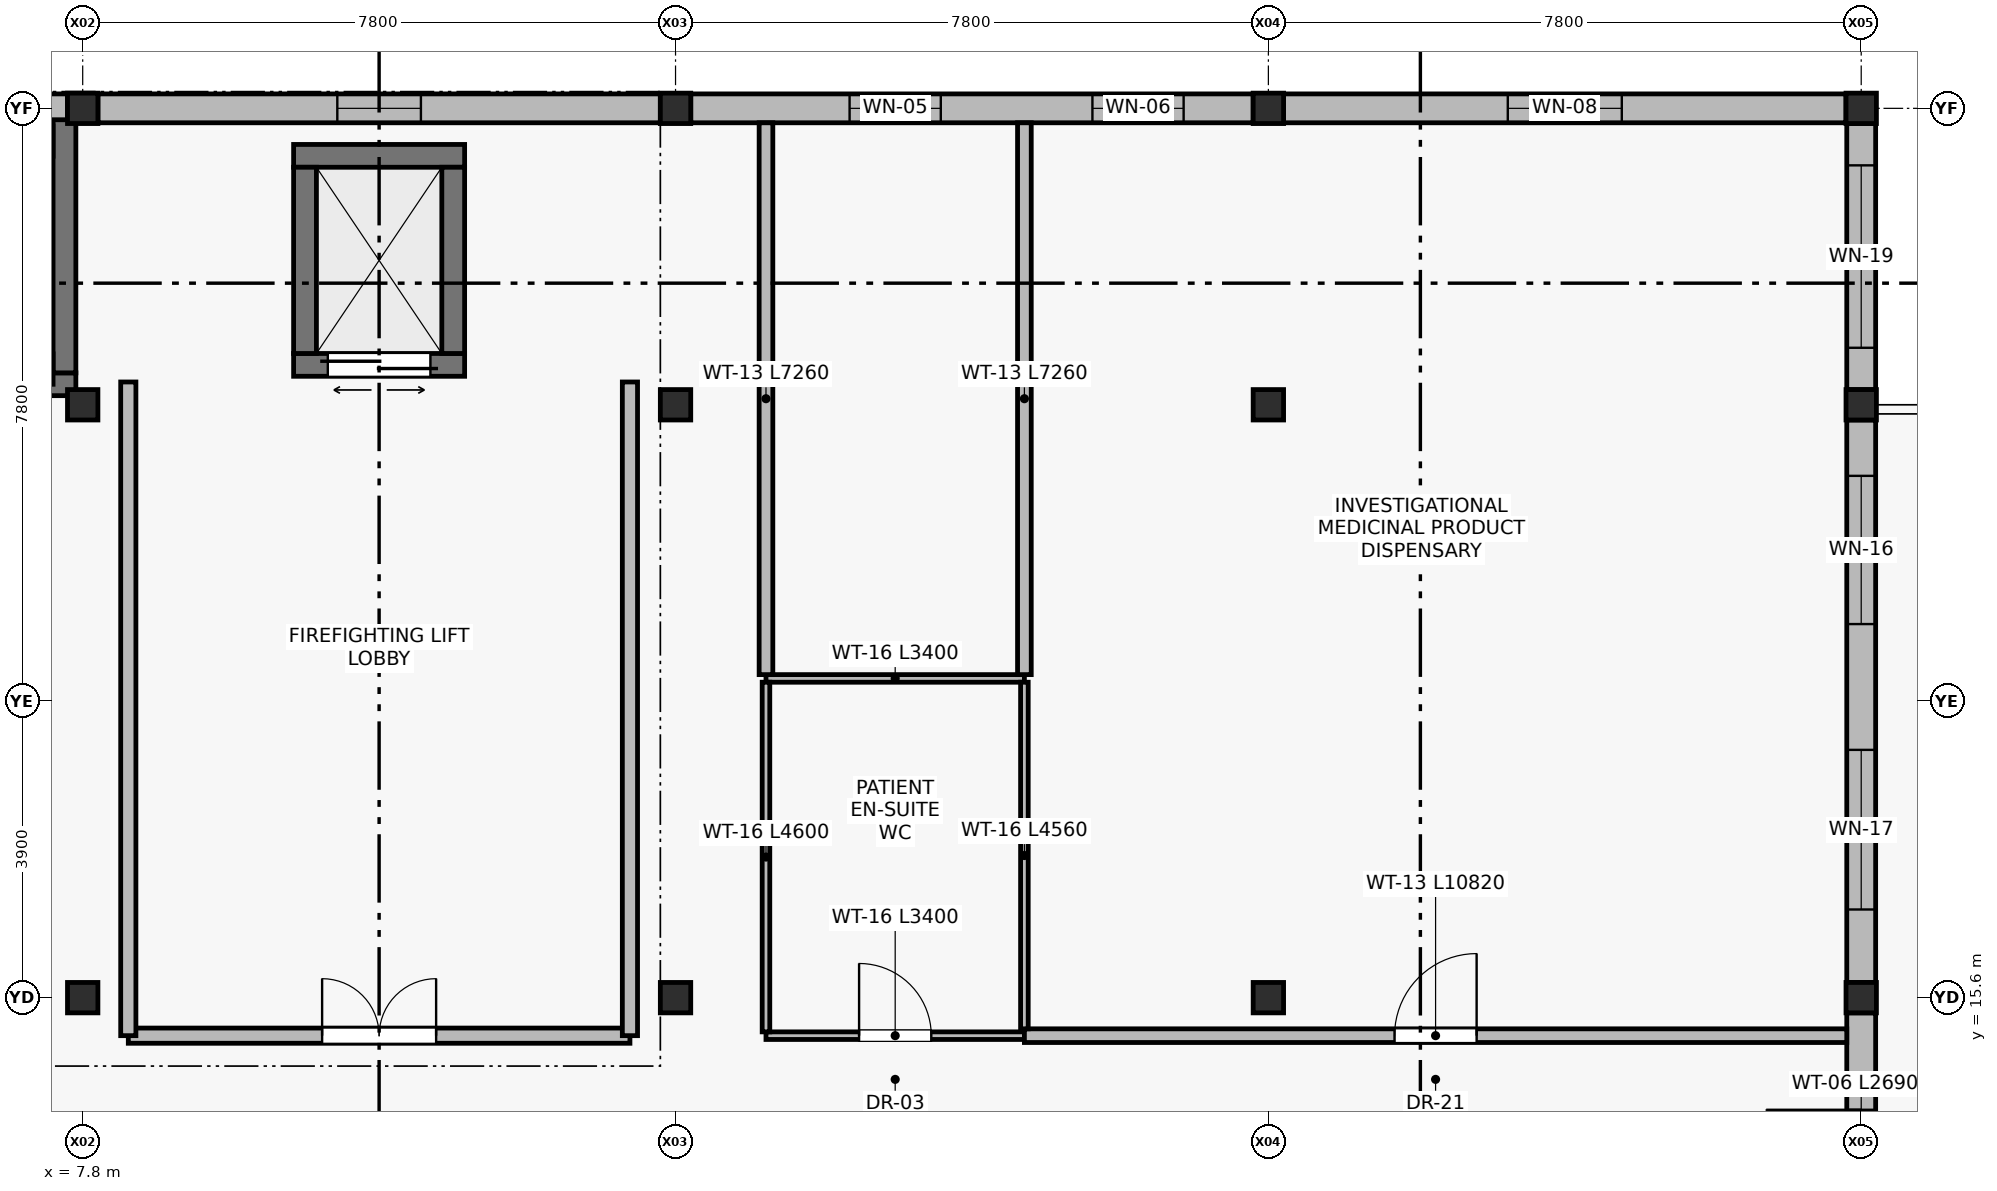
"""IFC4 building model, lengths in metres.
Left out: names, types, materials, properties, quantities, classifications, styles, units other than length and angle.
Written with IfcOpenShell. Run it as: python <this file> out.ifc"""

import sys

from ifc_helpers import new_model, si_unit, direction, frame, frame_2d, origin, origin_2d, place, context, subcontext, project, spatial, rectangle, extrude, element, fill, save


model = new_model("IFC4")
c1 = context("Model", 3, precision=1e-05, world=origin(), true_north=direction((0.0, 1.0)))
c2 = subcontext(c1, "Body", "Model", "MODEL_VIEW")
j1 = project(units=[si_unit("LENGTHUNIT", "METRE"), si_unit("PLANEANGLEUNIT", "RADIAN")], contexts=[c1])
p1 = place(None, origin())
s1 = spatial("IfcSite", under=j1, at=p1, CompositionType="ELEMENT")
p2 = place(p1, origin())
s2 = spatial("IfcBuilding", under=s1, at=p2, CompositionType="ELEMENT")
p3 = place(p2, frame((0.0, 0.0, 18.6)))
s3 = spatial("IfcBuildingStorey", under=s2, at=p3, CompositionType="ELEMENT", Elevation=18.6)
for number, where, z_axis, x_axis in (
    (1, (7.8, 15.6, 0.0), (0.0, 0.0, 1.0), (1.0, 0.0, 0.0)),
    (2, (7.8, 23.4, 0.0), (0.0, 0.0, 1.0), (1.0, 0.0, 0.0)),
    (3, (7.8, 27.3, 0.0), (0.0, 0.0, 1.0), (1.0, 0.0, 0.0)),
    (4, (15.6, 15.6, 0.0), (0.0, 0.0, 1.0), (1.0, 0.0, 0.0)),
    (5, (15.6, 23.4, 0.0), (0.0, 0.0, 1.0), (1.0, 0.0, 0.0)),
    (6, (15.6, 27.3, 0.0), (0.0, 0.0, 1.0), (1.0, 0.0, 0.0)),
    (7, (23.4, 15.6, 0.0), (0.0, 0.0, 1.0), (1.0, 0.0, 0.0)),
    (8, (23.4, 23.4, 0.0), (0.0, 0.0, 1.0), (1.0, 0.0, 0.0)),
    (9, (23.4, 27.3, 0.0), (0.0, 0.0, 1.0), (1.0, 0.0, 0.0)),
    (10, (31.2, 15.6, 0.0), (0.0, 0.0, 1.0), (1.0, 0.0, 0.0)),
    (11, (31.2, 23.4, 0.0), (0.0, 0.0, 1.0), (1.0, 0.0, 0.0)),
    (12, (31.2, 27.3, 0.0), (0.0, 0.0, 1.0), (1.0, 0.0, 0.0)),
    (13, (7.21, 23.87, 0.0), (0.0, 0.0, 1.0), (1.0, 0.0, 0.0)),
    (14, (7.21, 26.87, 0.0), (0.0, 0.0, 1.0), (1.0, 0.0, 0.0)),
):
    element("IfcColumn", number, at=place(p3, frame(where, z_axis=z_axis, x_axis=x_axis)), inside=s3, PredefinedType="COLUMN", context=c2, shape_type="SweptSolid", body=[
        extrude(rectangle(XDim=0.4, YDim=0.4, at=origin_2d()), origin(), (0.0, 0.0, 1.0), 4.5),
    ])
p4 = place(p3, frame((0.2, 27.3, 0.0), z_axis=(0.0, 0.0, 1.0), x_axis=(1.0, 0.0, 0.0)))
e15 = element("IfcWall", 15, at=p4, inside=s3, PredefinedType="STANDARD", context=c2, shape_type="SweptSolid", body=[
    extrude(rectangle(XDim=7.4, YDim=0.38, at=frame_2d((3.7, 0.0))), origin(), (0.0, 0.0, 1.0), 3.95),
])
p5 = place(p4, frame((0.895, 0.0, 0.9)))
e16 = element("IfcOpeningElement", 16, at=p5, cuts=e15, PredefinedType="OPENING", context=c2, shape_type="SweptSolid", body=[
    extrude(rectangle(XDim=0.9, YDim=1.6, at=frame_2d((0.45, 0.8))), frame((0.0, 0.2, 0.0), z_axis=(0.0, -1.0, 0.0), x_axis=(1.0, 0.0, 0.0)), (0.0, 0.0, 1.0), 0.4),
])
p6 = place(p4, frame((4.01, 0.0, 0.9)))
e17 = element("IfcOpeningElement", 17, at=p6, cuts=e15, PredefinedType="OPENING", context=c2, shape_type="SweptSolid", body=[
    extrude(rectangle(XDim=0.9, YDim=1.6, at=frame_2d((0.45, 0.8))), frame((0.0, 0.2, 0.0), z_axis=(0.0, -1.0, 0.0), x_axis=(1.0, 0.0, 0.0)), (0.0, 0.0, 1.0), 0.4),
])
p7 = place(p3, frame((8.0, 27.3, 0.0), z_axis=(0.0, 0.0, 1.0), x_axis=(1.0, 0.0, 0.0)))
e18 = element("IfcWall", 18, at=p7, inside=s3, PredefinedType="STANDARD", context=c2, shape_type="SweptSolid", body=[
    extrude(rectangle(XDim=7.4, YDim=0.38, at=frame_2d((3.7, 0.0))), origin(), (0.0, 0.0, 1.0), 3.95),
])
p8 = place(p7, frame((3.15, 0.0, 0.9)))
e19 = element("IfcOpeningElement", 19, at=p8, cuts=e18, PredefinedType="OPENING", context=c2, shape_type="SweptSolid", body=[
    extrude(rectangle(XDim=1.1, YDim=1.6, at=frame_2d((0.55, 0.8))), frame((0.0, 0.2, 0.0), z_axis=(0.0, -1.0, 0.0), x_axis=(1.0, 0.0, 0.0)), (0.0, 0.0, 1.0), 0.4),
])
p9 = place(p3, frame((15.8, 27.3, 0.0), z_axis=(0.0, 0.0, 1.0), x_axis=(1.0, 0.0, 0.0)))
e20 = element("IfcWall", 20, at=p9, inside=s3, PredefinedType="STANDARD", context=c2, shape_type="SweptSolid", body=[
    extrude(rectangle(XDim=7.4, YDim=0.38, at=frame_2d((3.7, 0.0))), origin(), (0.0, 0.0, 1.0), 3.95),
])
p10 = place(p9, frame((2.09, 0.0, 0.9)))
e21 = element("IfcOpeningElement", 21, at=p10, cuts=e20, PredefinedType="OPENING", context=c2, shape_type="SweptSolid", body=[
    extrude(rectangle(XDim=1.2, YDim=1.8, at=frame_2d((0.6, 0.9))), frame((0.0, 0.2, 0.0), z_axis=(0.0, -1.0, 0.0), x_axis=(1.0, 0.0, 0.0)), (0.0, 0.0, 1.0), 0.4),
])
p11 = place(p9, frame((5.285, 0.0, 0.9)))
e22 = element("IfcOpeningElement", 22, at=p11, cuts=e20, PredefinedType="OPENING", context=c2, shape_type="SweptSolid", body=[
    extrude(rectangle(XDim=1.2, YDim=2.1, at=frame_2d((0.6, 1.05))), frame((0.0, 0.2, 0.0), z_axis=(0.0, -1.0, 0.0), x_axis=(1.0, 0.0, 0.0)), (0.0, 0.0, 1.0), 0.4),
])
p12 = place(p3, frame((23.6, 27.3, 0.0), z_axis=(0.0, 0.0, 1.0), x_axis=(1.0, 0.0, 0.0)))
e23 = element("IfcWall", 23, at=p12, inside=s3, PredefinedType="STANDARD", context=c2, shape_type="SweptSolid", body=[
    extrude(rectangle(XDim=7.4, YDim=0.38, at=frame_2d((3.7, 0.0))), origin(), (0.0, 0.0, 1.0), 3.95),
])
p13 = place(p12, frame((2.95, 0.0, 0.9)))
e24 = element("IfcOpeningElement", 24, at=p13, cuts=e23, PredefinedType="OPENING", context=c2, shape_type="SweptSolid", body=[
    extrude(rectangle(XDim=1.5, YDim=1.5, at=frame_2d((0.75, 0.75))), frame((0.0, 0.2, 0.0), z_axis=(0.0, -1.0, 0.0), x_axis=(1.0, 0.0, 0.0)), (0.0, 0.0, 1.0), 0.4),
])
p14 = place(p3, frame((31.2, 15.4, 0.0), z_axis=(0.0, 0.0, 1.0), x_axis=(0.0, -1.0, 0.0)))
e25 = element("IfcWall", 25, at=p14, inside=s3, PredefinedType="STANDARD", context=c2, shape_type="SweptSolid", body=[
    extrude(rectangle(XDim=7.4, YDim=0.38, at=frame_2d((3.7, 0.0))), origin(), (0.0, 0.0, 1.0), 3.9),
])
p15 = place(p14, frame((1.275, 0.0, 0.0)))
e26 = element("IfcOpeningElement", 26, at=p15, cuts=e25, PredefinedType="OPENING", context=c2, shape_type="SweptSolid", body=[
    extrude(rectangle(XDim=1.25, YDim=2.2, at=frame_2d((0.625, 1.1))), frame((0.0, 0.2, 0.0), z_axis=(0.0, -1.0, 0.0), x_axis=(1.0, 0.0, 0.0)), (0.0, 0.0, 1.0), 0.4),
])
p16 = place(p3, frame((31.2, 23.2, 0.0), z_axis=(0.0, 0.0, 1.0), x_axis=(0.0, -1.0, 0.0)))
e27 = element("IfcWall", 27, at=p16, inside=s3, PredefinedType="STANDARD", context=c2, shape_type="SweptSolid", body=[
    extrude(rectangle(XDim=7.4, YDim=0.38, at=frame_2d((3.7, 0.0))), origin(), (0.0, 0.0, 1.0), 3.9),
])
p17 = place(p16, frame((0.735, 0.0, 0.9)))
e28 = element("IfcOpeningElement", 28, at=p17, cuts=e27, PredefinedType="OPENING", context=c2, shape_type="SweptSolid", body=[
    extrude(rectangle(XDim=1.95, YDim=2.15, at=frame_2d((0.975, 1.075))), frame((0.0, 0.2, 0.0), z_axis=(0.0, -1.0, 0.0), x_axis=(1.0, 0.0, 0.0)), (0.0, 0.0, 1.0), 0.4),
])
p18 = place(p16, frame((4.34, 0.0, 0.9)))
e29 = element("IfcOpeningElement", 29, at=p18, cuts=e27, PredefinedType="OPENING", context=c2, shape_type="SweptSolid", body=[
    extrude(rectangle(XDim=2.1, YDim=1.8, at=frame_2d((1.05, 0.9))), frame((0.0, 0.2, 0.0), z_axis=(0.0, -1.0, 0.0), x_axis=(1.0, 0.0, 0.0)), (0.0, 0.0, 1.0), 0.4),
])
p19 = place(p3, frame((31.2, 27.1, 0.0), z_axis=(0.0, 0.0, 1.0), x_axis=(0.0, -1.0, 0.0)))
e30 = element("IfcWall", 30, at=p19, inside=s3, PredefinedType="STANDARD", context=c2, shape_type="SweptSolid", body=[
    extrude(rectangle(XDim=3.5, YDim=0.38, at=frame_2d((1.75, 0.0))), origin(), (0.0, 0.0, 1.0), 3.9),
])
p20 = place(p19, frame((0.55, 0.0, 0.9)))
e31 = element("IfcOpeningElement", 31, at=p20, cuts=e30, PredefinedType="OPENING", context=c2, shape_type="SweptSolid", body=[
    extrude(rectangle(XDim=2.4, YDim=2.0, at=frame_2d((1.2, 1.0))), frame((0.0, 0.2, 0.0), z_axis=(0.0, -1.0, 0.0), x_axis=(1.0, 0.0, 0.0)), (0.0, 0.0, 1.0), 0.4),
])
p21 = place(p3, frame((0.15, 23.67, 0.0), z_axis=(0.0, 0.0, 1.0), x_axis=(1.0, 0.0, 0.0)))
e32 = element("IfcWall", 32, at=p21, inside=s3, PredefinedType="SHEAR", context=c2, shape_type="SweptSolid", body=[
    extrude(rectangle(XDim=7.56, YDim=0.3, at=frame_2d((3.78, 0.0))), origin(), (0.0, 0.0, 1.0), 4.24),
])
p22 = place(p21, frame((0.56, 0.0, 0.0)))
e33 = element("IfcOpeningElement", 33, at=p22, cuts=e32, PredefinedType="OPENING", context=c2, shape_type="SweptSolid", body=[
    extrude(rectangle(XDim=1.4, YDim=2.2, at=frame_2d((0.7, 1.1))), frame((0.0, 0.16, 0.0), z_axis=(0.0, -1.0, 0.0), x_axis=(1.0, 0.0, 0.0)), (0.0, 0.0, 1.0), 0.32),
])
p23 = place(p3, frame((7.56, 23.82, 0.0), z_axis=(0.0, 0.0, 1.0), x_axis=(0.0, 1.0, 0.0)))
e34 = element("IfcWall", 34, at=p23, inside=s3, PredefinedType="SHEAR", context=c2, shape_type="SweptSolid", body=[
    extrude(rectangle(XDim=3.33, YDim=0.3, at=frame_2d((1.665, 0.0))), origin(), (0.0, 0.0, 1.0), 4.24),
])
p24 = place(p3, frame((10.575, 23.925, 0.0), z_axis=(0.0, 0.0, 1.0), x_axis=(1.0, 0.0, 0.0)))
e35 = element("IfcWall", 35, at=p24, inside=s3, PredefinedType="SHEAR", context=c2, shape_type="SweptSolid", body=[
    extrude(rectangle(XDim=2.25, YDim=0.3, at=frame_2d((1.125, 0.0))), origin(), (0.0, 0.0, 1.0), 4.24),
])
p25 = place(p24, frame((0.45, 0.0, 0.0)))
e36 = element("IfcOpeningElement", 36, at=p25, cuts=e35, PredefinedType="OPENING", context=c2, shape_type="SweptSolid", body=[
    extrude(rectangle(XDim=1.35, YDim=2.3, at=frame_2d((0.675, 1.15))), frame((0.0, 0.16, 0.0), z_axis=(0.0, -1.0, 0.0), x_axis=(1.0, 0.0, 0.0)), (0.0, 0.0, 1.0), 0.32),
])
p26 = place(p3, frame((12.825, 26.675, 0.0), z_axis=(0.0, 0.0, 1.0), x_axis=(-1.0, 0.0, 0.0)))
e37 = element("IfcWall", 37, at=p26, inside=s3, PredefinedType="SHEAR", context=c2, shape_type="SweptSolid", body=[
    extrude(rectangle(XDim=2.25, YDim=0.3, at=frame_2d((1.125, 0.0))), origin(), (0.0, 0.0, 1.0), 4.24),
])
for number, where, z_axis, x_axis in (
    (38, (10.725, 26.525, 0.0), (0.0, 0.0, 1.0), (0.0, -1.0, 0.0)),
    (39, (12.675, 24.075, 0.0), (0.0, 0.0, 1.0), (0.0, 1.0, 0.0)),
):
    element("IfcWall", number, at=place(p3, frame(where, z_axis=z_axis, x_axis=x_axis)), inside=s3, PredefinedType="SHEAR", context=c2, shape_type="SweptSolid", body=[
        extrude(rectangle(XDim=2.45, YDim=0.3, at=frame_2d((1.225, 0.0))), origin(), (0.0, 0.0, 1.0), 4.24),
    ])
p27 = place(p3, frame((8.4, 15.1, 0.0), z_axis=(0.0, 0.0, 1.0), x_axis=(1.0, 0.0, 0.0)))
e40 = element("IfcWall", 40, at=p27, inside=s3, PredefinedType="SOLIDWALL", context=c2, shape_type="SweptSolid", body=[
    extrude(rectangle(XDim=6.6, YDim=0.2, at=frame_2d((3.3, 0.0))), origin(), (0.0, 0.0, 1.0), 4.24),
])
p28 = place(p27, frame((2.55, 0.0, 0.0)))
e41 = element("IfcOpeningElement", 41, at=p28, cuts=e40, PredefinedType="OPENING", context=c2, shape_type="SweptSolid", body=[
    extrude(rectangle(XDim=1.5, YDim=2.2, at=frame_2d((0.75, 1.1))), frame((0.0, 0.11, 0.0), z_axis=(0.0, -1.0, 0.0), x_axis=(1.0, 0.0, 0.0)), (0.0, 0.0, 1.0), 0.22),
])
for number, where, z_axis, x_axis in (
    (42, (8.4, 23.7, 0.0), (0.0, 0.0, 1.0), (0.0, -1.0, 0.0)),
    (43, (15.0, 15.1, 0.0), (0.0, 0.0, 1.0), (0.0, 1.0, 0.0)),
):
    element("IfcWall", number, at=place(p3, frame(where, z_axis=z_axis, x_axis=x_axis)), inside=s3, PredefinedType="SOLIDWALL", context=c2, shape_type="SweptSolid", body=[
        extrude(rectangle(XDim=8.6, YDim=0.2, at=frame_2d((4.3, 0.0))), origin(), (0.0, 0.0, 1.0), 4.24),
    ])
p29 = place(p3, frame((16.79, 15.1, 0.0), z_axis=(0.0, 0.0, 1.0), x_axis=(1.0, 0.0, 0.0)))
e44 = element("IfcWall", 44, at=p29, inside=s3, PredefinedType="PARTITIONING", context=c2, shape_type="SweptSolid", body=[
    extrude(rectangle(XDim=3.4, YDim=0.1, at=frame_2d((1.7, 0.0))), origin(), (0.0, 0.0, 1.0), 4.24),
])
p30 = place(p29, frame((1.225, 0.0, 0.0)))
e45 = element("IfcOpeningElement", 45, at=p30, cuts=e44, PredefinedType="OPENING", context=c2, shape_type="SweptSolid", body=[
    extrude(rectangle(XDim=0.95, YDim=2.1, at=frame_2d((0.475, 1.05))), frame((0.0, 0.06, 0.0), z_axis=(0.0, -1.0, 0.0), x_axis=(1.0, 0.0, 0.0)), (0.0, 0.0, 1.0), 0.12),
])
p31 = place(p3, frame((16.79, 19.8, 0.0), z_axis=(0.0, 0.0, 1.0), x_axis=(1.0, 0.0, 0.0)))
e46 = element("IfcWall", 46, at=p31, inside=s3, PredefinedType="PARTITIONING", context=c2, shape_type="SweptSolid", body=[
    extrude(rectangle(XDim=3.4, YDim=0.1, at=frame_2d((1.7, 0.0))), origin(), (0.0, 0.0, 1.0), 4.24),
])
p32 = place(p3, frame((20.19, 15.1, 0.0), z_axis=(0.0, 0.0, 1.0), x_axis=(1.0, 0.0, 0.0)))
e47 = element("IfcWall", 47, at=p32, inside=s3, PredefinedType="PARTITIONING", context=c2, shape_type="SweptSolid", body=[
    extrude(rectangle(XDim=10.82, YDim=0.18, at=frame_2d((5.41, 0.0))), origin(), (0.0, 0.0, 1.0), 4.24),
])
p33 = place(p32, frame((4.87, 0.0, 0.0)))
e48 = element("IfcOpeningElement", 48, at=p33, cuts=e47, PredefinedType="OPENING", context=c2, shape_type="SweptSolid", body=[
    extrude(rectangle(XDim=1.08, YDim=2.2, at=frame_2d((0.54, 1.1))), frame((0.0, 0.1, 0.0), z_axis=(0.0, -1.0, 0.0), x_axis=(1.0, 0.0, 0.0)), (0.0, 0.0, 1.0), 0.2),
])
p34 = place(p3, frame((16.79, 15.15, 0.0), z_axis=(0.0, 0.0, 1.0), x_axis=(0.0, 1.0, 0.0)))
e49 = element("IfcWall", 49, at=p34, inside=s3, PredefinedType="PARTITIONING", context=c2, shape_type="SweptSolid", body=[
    extrude(rectangle(XDim=4.6, YDim=0.1, at=frame_2d((2.3, 0.0))), origin(), (0.0, 0.0, 1.0), 4.24),
])
p35 = place(p3, frame((20.19, 15.19, 0.0), z_axis=(0.0, 0.0, 1.0), x_axis=(0.0, 1.0, 0.0)))
e50 = element("IfcWall", 50, at=p35, inside=s3, PredefinedType="PARTITIONING", context=c2, shape_type="SweptSolid", body=[
    extrude(rectangle(XDim=4.56, YDim=0.1, at=frame_2d((2.28, 0.0))), origin(), (0.0, 0.0, 1.0), 4.24),
])
for number, where, z_axis, x_axis in (
    (51, (20.19, 19.85, 0.0), (0.0, 0.0, 1.0), (0.0, 1.0, 0.0)),
    (52, (16.79, 19.85, 0.0), (0.0, 0.0, 1.0), (0.0, 1.0, 0.0)),
):
    element("IfcWall", number, at=place(p3, frame(where, z_axis=z_axis, x_axis=x_axis)), inside=s3, PredefinedType="PARTITIONING", context=c2, shape_type="SweptSolid", body=[
        extrude(rectangle(XDim=7.26, YDim=0.18, at=frame_2d((3.63, 0.0))), origin(), (0.0, 0.0, 1.0), 4.24),
    ])
p36 = place(p8, origin())
e53 = element("IfcWindow", 53, at=p36, inside=s3, PartitioningType="SINGLE_PANEL", PredefinedType="WINDOW", context=c2, shape_type="SweptSolid", body=[
    extrude(rectangle(XDim=1.1, YDim=1.6, at=frame_2d((0.55, 0.8))), frame((0.0, 0.03, 0.0), z_axis=(0.0, -1.0, 0.0), x_axis=(1.0, 0.0, 0.0)), (0.0, 0.0, 1.0), 0.06),
])
fill(e19, e53)
p37 = place(p10, origin())
e54 = element("IfcWindow", 54, at=p37, inside=s3, PartitioningType="SINGLE_PANEL", PredefinedType="WINDOW", context=c2, shape_type="SweptSolid", body=[
    extrude(rectangle(XDim=1.2, YDim=1.8, at=frame_2d((0.6, 0.9))), frame((0.0, 0.03, 0.0), z_axis=(0.0, -1.0, 0.0), x_axis=(1.0, 0.0, 0.0)), (0.0, 0.0, 1.0), 0.06),
])
fill(e21, e54)
p38 = place(p11, origin())
e55 = element("IfcWindow", 55, at=p38, inside=s3, PartitioningType="SINGLE_PANEL", PredefinedType="WINDOW", context=c2, shape_type="SweptSolid", body=[
    extrude(rectangle(XDim=1.2, YDim=2.1, at=frame_2d((0.6, 1.05))), frame((0.0, 0.03, 0.0), z_axis=(0.0, -1.0, 0.0), x_axis=(1.0, 0.0, 0.0)), (0.0, 0.0, 1.0), 0.06),
])
fill(e22, e55)
p39 = place(p13, origin())
e56 = element("IfcWindow", 56, at=p39, inside=s3, PartitioningType="SINGLE_PANEL", PredefinedType="WINDOW", context=c2, shape_type="SweptSolid", body=[
    extrude(rectangle(XDim=1.5, YDim=1.5, at=frame_2d((0.75, 0.75))), frame((0.0, 0.03, 0.0), z_axis=(0.0, -1.0, 0.0), x_axis=(1.0, 0.0, 0.0)), (0.0, 0.0, 1.0), 0.06),
])
fill(e24, e56)
p40 = place(p15, frame((1.25, 0.0, 0.0), z_axis=(0.0, 0.0, 1.0), x_axis=(-1.0, 0.0, 0.0)))
e57 = element("IfcDoor", 57, at=p40, inside=s3, OperationType="SINGLE_SWING_LEFT", PredefinedType="DOOR", context=c2, shape_type="SweptSolid", body=[
    extrude(rectangle(XDim=1.25, YDim=2.2, at=frame_2d((0.625, 1.1))), frame((0.0, 0.025, 0.0), z_axis=(0.0, -1.0, 0.0), x_axis=(1.0, 0.0, 0.0)), (0.0, 0.0, 1.0), 0.05),
])
fill(e26, e57)
p41 = place(p17, origin())
e58 = element("IfcWindow", 58, at=p41, inside=s3, PartitioningType="SINGLE_PANEL", PredefinedType="WINDOW", context=c2, shape_type="SweptSolid", body=[
    extrude(rectangle(XDim=1.95, YDim=2.15, at=frame_2d((0.975, 1.075))), frame((0.0, 0.03, 0.0), z_axis=(0.0, -1.0, 0.0), x_axis=(1.0, 0.0, 0.0)), (0.0, 0.0, 1.0), 0.06),
])
fill(e28, e58)
p42 = place(p18, origin())
e59 = element("IfcWindow", 59, at=p42, inside=s3, PartitioningType="SINGLE_PANEL", PredefinedType="WINDOW", context=c2, shape_type="SweptSolid", body=[
    extrude(rectangle(XDim=2.1, YDim=1.8, at=frame_2d((1.05, 0.9))), frame((0.0, 0.03, 0.0), z_axis=(0.0, -1.0, 0.0), x_axis=(1.0, 0.0, 0.0)), (0.0, 0.0, 1.0), 0.06),
])
fill(e29, e59)
p43 = place(p20, origin())
e60 = element("IfcWindow", 60, at=p43, inside=s3, PartitioningType="SINGLE_PANEL", PredefinedType="WINDOW", context=c2, shape_type="SweptSolid", body=[
    extrude(rectangle(XDim=2.4, YDim=2.0, at=frame_2d((1.2, 1.0))), frame((0.0, 0.03, 0.0), z_axis=(0.0, -1.0, 0.0), x_axis=(1.0, 0.0, 0.0)), (0.0, 0.0, 1.0), 0.06),
])
fill(e31, e60)
p44 = place(p25, origin())
e61 = element("IfcDoor", 61, at=p44, inside=s3, OperationType="DOUBLE_DOOR_SLIDING", PredefinedType="DOOR", context=c2, shape_type="SweptSolid", body=[
    extrude(rectangle(XDim=1.35, YDim=2.3, at=frame_2d((0.675, 1.15))), frame((0.0, 0.025, 0.0), z_axis=(0.0, -1.0, 0.0), x_axis=(1.0, 0.0, 0.0)), (0.0, 0.0, 1.0), 0.05),
])
fill(e36, e61)
p45 = place(p28, origin())
e62 = element("IfcDoor", 62, at=p45, inside=s3, OperationType="DOUBLE_DOOR_SINGLE_SWING", PredefinedType="DOOR", context=c2, shape_type="SweptSolid", body=[
    extrude(rectangle(XDim=1.5, YDim=2.2, at=frame_2d((0.75, 1.1))), frame((0.0, 0.025, 0.0), z_axis=(0.0, -1.0, 0.0), x_axis=(1.0, 0.0, 0.0)), (0.0, 0.0, 1.0), 0.05),
])
fill(e41, e62)
p46 = place(p30, origin())
e63 = element("IfcDoor", 63, at=p46, inside=s3, OperationType="SINGLE_SWING_LEFT", PredefinedType="DOOR", context=c2, shape_type="SweptSolid", body=[
    extrude(rectangle(XDim=0.95, YDim=2.1, at=frame_2d((0.475, 1.05))), frame((0.0, 0.025, 0.0), z_axis=(0.0, -1.0, 0.0), x_axis=(1.0, 0.0, 0.0)), (0.0, 0.0, 1.0), 0.05),
])
fill(e45, e63)
p47 = place(p33, origin())
e64 = element("IfcDoor", 64, at=p47, inside=s3, OperationType="SINGLE_SWING_RIGHT", PredefinedType="DOOR", context=c2, shape_type="SweptSolid", body=[
    extrude(rectangle(XDim=1.08, YDim=2.2, at=frame_2d((0.54, 1.1))), frame((0.0, 0.025, 0.0), z_axis=(0.0, -1.0, 0.0), x_axis=(1.0, 0.0, 0.0)), (0.0, 0.0, 1.0), 0.05),
])
fill(e48, e64)
save(model, sys.argv[1])
